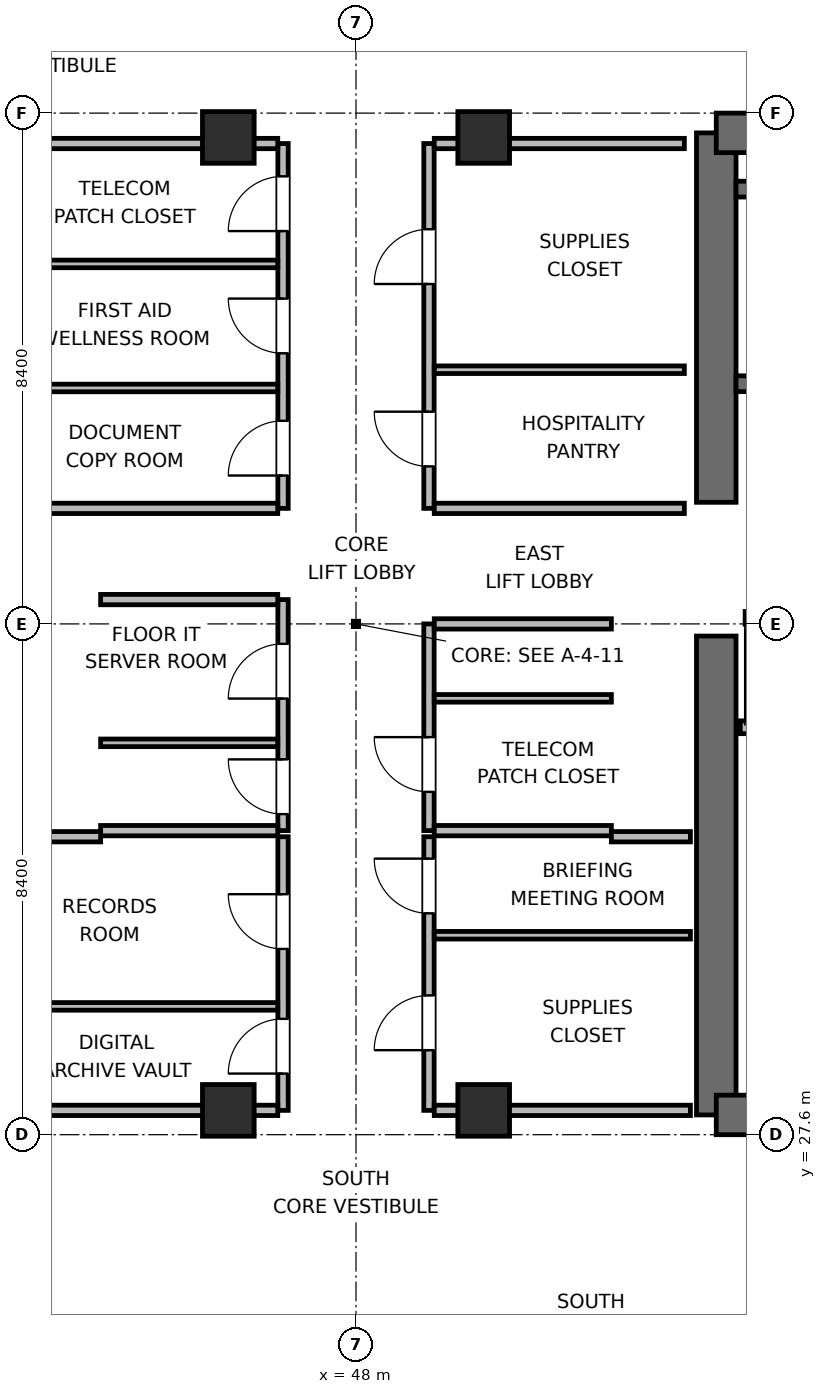
"""IFC4 building model, lengths in metres.
Left out: names, types, materials, properties, quantities, classifications, styles, units other than length and angle.
Written with IfcOpenShell. Run it as: python <this file> out.ifc"""

import sys

from ifc_helpers import new_model, si_unit, direction, frame, frame_2d, origin, origin_2d, place, context, subcontext, project, spatial, rectangle, extrude, element, fill, save


model = new_model("IFC4")
c1 = context("Model", 3, precision=1e-05, world=origin(), true_north=direction((0.0, 1.0)))
c2 = subcontext(c1, "Body", "Model", "MODEL_VIEW")
j1 = project(units=[si_unit("LENGTHUNIT", "METRE"), si_unit("PLANEANGLEUNIT", "RADIAN")], contexts=[c1])
p1 = place(None, origin())
s1 = spatial("IfcSite", under=j1, at=p1, CompositionType="ELEMENT")
p2 = place(p1, origin())
s2 = spatial("IfcBuilding", under=s1, at=p2, CompositionType="ELEMENT")
p3 = place(p2, frame((0.0, 0.0, 223.2)))
s3 = spatial("IfcBuildingStorey", under=s2, at=p3, CompositionType="ELEMENT", Elevation=223.2)
p4 = place(p3, frame((53.925, 27.925, 0.0), z_axis=(0.0, 0.0, 1.0), x_axis=(0.0, 1.0, 0.0)))
e1 = element("IfcWall", 1, at=p4, inside=s3, PredefinedType="SHEAR", context=c2, shape_type="SweptSolid", body=[
    extrude(rectangle(XDim=7.875, YDim=0.65, at=frame_2d((3.938, 0.0))), origin(), (0.0, 0.0, 1.0), 3.9),
])
p5 = place(p3, frame((53.925, 38.0, 0.0), z_axis=(0.0, 0.0, 1.0), x_axis=(0.0, 1.0, 0.0)))
e2 = element("IfcWall", 2, at=p5, inside=s3, PredefinedType="SHEAR", context=c2, shape_type="SweptSolid", body=[
    extrude(rectangle(XDim=6.075, YDim=0.65, at=frame_2d((3.038, 0.0))), origin(), (0.0, 0.0, 1.0), 3.9),
])
p6 = place(p3, frame((53.925, 27.925, 0.0), z_axis=(0.0, 0.0, 1.0), x_axis=(1.0, 0.0, 0.0)))
e3 = element("IfcWall", 3, at=p6, inside=s3, PredefinedType="SHEAR", context=c2, shape_type="SweptSolid", body=[
    extrude(rectangle(XDim=9.35, YDim=0.65, at=frame_2d((4.675, 0.0))), origin(), (0.0, 0.0, 1.0), 3.9),
])
p7 = place(p6, frame((3.975, 0.0, 0.0)))
e4 = element("IfcOpeningElement", 4, at=p7, cuts=e3, PredefinedType="OPENING", context=c2, shape_type="SweptSolid", body=[
    extrude(rectangle(XDim=1.05, YDim=2.04, at=frame_2d((0.525, 1.02))), frame((0.0, 0.335, 0.0), z_axis=(0.0, -1.0, 0.0), x_axis=(1.0, 0.0, 0.0)), (0.0, 0.0, 1.0), 0.67),
])
p8 = place(p3, frame((53.925, 44.075, 0.0), z_axis=(0.0, 0.0, 1.0), x_axis=(1.0, 0.0, 0.0)))
e5 = element("IfcWall", 5, at=p8, inside=s3, PredefinedType="SHEAR", context=c2, shape_type="SweptSolid", body=[
    extrude(rectangle(XDim=9.35, YDim=0.65, at=frame_2d((4.675, 0.0))), origin(), (0.0, 0.0, 1.0), 3.9),
])
p9 = place(p3, frame((54.25, 39.95, 0.0), z_axis=(0.0, 0.0, 1.0), x_axis=(1.0, 0.0, 0.0)))
e6 = element("IfcWall", 6, at=p9, inside=s3, PredefinedType="SHEAR", context=c2, shape_type="SweptSolid", body=[
    extrude(rectangle(XDim=8.7, YDim=0.26, at=frame_2d((4.35, 0.0))), origin(), (0.0, 0.0, 1.0), 3.9),
])
p10 = place(p9, frame((0.95, 0.0, 0.0)))
e7 = element("IfcOpeningElement", 7, at=p10, cuts=e6, PredefinedType="OPENING", context=c2, shape_type="SweptSolid", body=[
    extrude(rectangle(XDim=1.0, YDim=2.04, at=frame_2d((0.5, 1.02))), frame((0.0, 0.14, 0.0), z_axis=(0.0, -1.0, 0.0), x_axis=(1.0, 0.0, 0.0)), (0.0, 0.0, 1.0), 0.28),
])
p11 = place(p3, frame((54.25, 43.15, 0.0), z_axis=(0.0, 0.0, 1.0), x_axis=(1.0, 0.0, 0.0)))
e8 = element("IfcWall", 8, at=p11, inside=s3, PredefinedType="SHEAR", context=c2, shape_type="SweptSolid", body=[
    extrude(rectangle(XDim=8.7, YDim=0.26, at=frame_2d((4.35, 0.0))), origin(), (0.0, 0.0, 1.0), 3.9),
])
for number, where, z_axis, x_axis in (
    (9, (45.9, 28.0, 0.0), (0.0, 0.0, 1.0), (1.0, 0.0, 0.0)),
    (10, (50.1, 28.0, 0.0), (0.0, 0.0, 1.0), (1.0, 0.0, 0.0)),
    (11, (45.9, 44.0, 0.0), (0.0, 0.0, 1.0), (1.0, 0.0, 0.0)),
    (12, (50.1, 44.0, 0.0), (0.0, 0.0, 1.0), (1.0, 0.0, 0.0)),
):
    element("IfcColumn", number, at=place(p3, frame(where, z_axis=z_axis, x_axis=x_axis)), inside=s3, PredefinedType="COLUMN", context=c2, shape_type="SweptSolid", body=[
        extrude(rectangle(XDim=0.85, YDim=0.85, at=origin_2d()), origin(), (0.0, 0.0, 1.0), 3.9),
    ])
p12 = place(p3, frame((54.32, 34.3, 0.0), z_axis=(0.0, 0.0, 1.0), x_axis=(1.0, 0.0, 0.0)))
e13 = element("IfcWall", 13, at=p12, inside=s3, PredefinedType="PARTITIONING", context=c2, shape_type="SweptSolid", body=[
    extrude(rectangle(XDim=3.48, YDim=0.21, at=frame_2d((1.74, 0.0))), origin(), (0.0, 0.0, 1.0), 3.68),
])
p13 = place(p3, frame((54.4, 36.1, 0.0), z_axis=(0.0, 0.0, 1.0), x_axis=(1.0, 0.0, 0.0)))
e14 = element("IfcWall", 14, at=p13, inside=s3, PredefinedType="PARTITIONING", context=c2, shape_type="SweptSolid", body=[
    extrude(rectangle(XDim=2.1, YDim=0.21, at=frame_2d((1.05, 0.0))), origin(), (0.0, 0.0, 1.0), 3.68),
])
p14 = place(p13, frame((0.5, 0.0, 0.0)))
e15 = element("IfcOpeningElement", 15, at=p14, cuts=e14, PredefinedType="OPENING", context=c2, shape_type="SweptSolid", body=[
    extrude(rectangle(XDim=1.1, YDim=2.04, at=frame_2d((0.55, 1.02))), frame((0.0, 0.115, 0.0), z_axis=(0.0, -1.0, 0.0), x_axis=(1.0, 0.0, 0.0)), (0.0, 0.0, 1.0), 0.23),
])
p15 = place(p3, frame((46.8, 32.6, 0.0), z_axis=(0.0, 0.0, 1.0), x_axis=(0.0, 1.0, 0.0)))
e16 = element("IfcWall", 16, at=p15, inside=s3, PredefinedType="PARTITIONING", context=c2, shape_type="SweptSolid", body=[
    extrude(rectangle(XDim=3.8, YDim=0.17, at=frame_2d((1.9, 0.0))), origin(), (0.0, 0.0, 1.0), 3.68),
])
p16 = place(p15, frame((0.272, 0.0, 0.0)))
e17 = element("IfcOpeningElement", 17, at=p16, cuts=e16, PredefinedType="OPENING", context=c2, shape_type="SweptSolid", body=[
    extrude(rectangle(XDim=0.9, YDim=2.02, at=frame_2d((0.45, 1.01))), frame((0.0, 0.095, 0.0), z_axis=(0.0, -1.0, 0.0), x_axis=(1.0, 0.0, 0.0)), (0.0, 0.0, 1.0), 0.19),
])
p17 = place(p15, frame((2.172, 0.0, 0.0)))
e18 = element("IfcOpeningElement", 18, at=p17, cuts=e16, PredefinedType="OPENING", context=c2, shape_type="SweptSolid", body=[
    extrude(rectangle(XDim=0.9, YDim=2.02, at=frame_2d((0.45, 1.01))), frame((0.0, 0.095, 0.0), z_axis=(0.0, -1.0, 0.0), x_axis=(1.0, 0.0, 0.0)), (0.0, 0.0, 1.0), 0.19),
])
for number, where, z_axis, x_axis in (
    (19, (43.8, 32.6, 0.0), (0.0, 0.0, 1.0), (1.0, 0.0, 0.0)),
    (20, (43.8, 36.4, 0.0), (0.0, 0.0, 1.0), (1.0, 0.0, 0.0)),
):
    element("IfcWall", number, at=place(p3, frame(where, z_axis=z_axis, x_axis=x_axis)), inside=s3, PredefinedType="PARTITIONING", context=c2, shape_type="SweptSolid", body=[
        extrude(rectangle(XDim=2.913, YDim=0.17, at=frame_2d((1.457, 0.0))), origin(), (0.0, 0.0, 1.0), 3.68),
    ])
p18 = place(p3, frame((43.8, 34.044, 0.0), z_axis=(0.0, 0.0, 1.0), x_axis=(1.0, 0.0, 0.0)))
e21 = element("IfcWall", 21, at=p18, inside=s3, PredefinedType="PARTITIONING", context=c2, shape_type="SweptSolid", body=[
    extrude(rectangle(XDim=2.913, YDim=0.125, at=frame_2d((1.457, 0.0))), origin(), (0.0, 0.0, 1.0), 3.68),
])
p19 = place(p3, frame((49.2, 32.6, 0.0), z_axis=(0.0, 0.0, 1.0), x_axis=(0.0, 1.0, 0.0)))
e22 = element("IfcWall", 22, at=p19, inside=s3, PredefinedType="PARTITIONING", context=c2, shape_type="SweptSolid", body=[
    extrude(rectangle(XDim=3.4, YDim=0.17, at=frame_2d((1.7, 0.0))), origin(), (0.0, 0.0, 1.0), 3.68),
])
p20 = place(p19, frame((0.638, 0.0, 0.0)))
e23 = element("IfcOpeningElement", 23, at=p20, cuts=e22, PredefinedType="OPENING", context=c2, shape_type="SweptSolid", body=[
    extrude(rectangle(XDim=0.9, YDim=2.02, at=frame_2d((0.45, 1.01))), frame((0.0, 0.095, 0.0), z_axis=(0.0, -1.0, 0.0), x_axis=(1.0, 0.0, 0.0)), (0.0, 0.0, 1.0), 0.19),
])
for number, where, z_axis, x_axis in (
    (24, (49.287, 32.6, 0.0), (0.0, 0.0, 1.0), (1.0, 0.0, 0.0)),
    (25, (49.287, 36.0, 0.0), (0.0, 0.0, 1.0), (1.0, 0.0, 0.0)),
):
    element("IfcWall", number, at=place(p3, frame(where, z_axis=z_axis, x_axis=x_axis)), inside=s3, PredefinedType="PARTITIONING", context=c2, shape_type="SweptSolid", body=[
        extrude(rectangle(XDim=2.913, YDim=0.17, at=frame_2d((1.457, 0.0))), origin(), (0.0, 0.0, 1.0), 3.68),
    ])
p21 = place(p3, frame((49.287, 34.776, 0.0), z_axis=(0.0, 0.0, 1.0), x_axis=(1.0, 0.0, 0.0)))
e26 = element("IfcWall", 26, at=p21, inside=s3, PredefinedType="PARTITIONING", context=c2, shape_type="SweptSolid", body=[
    extrude(rectangle(XDim=2.913, YDim=0.125, at=frame_2d((1.457, 0.0))), origin(), (0.0, 0.0, 1.0), 3.68),
])
p22 = place(p3, frame((46.8, 28.0, 0.0), z_axis=(0.0, 0.0, 1.0), x_axis=(0.0, 1.0, 0.0)))
e27 = element("IfcWall", 27, at=p22, inside=s3, PredefinedType="PARTITIONING", context=c2, shape_type="SweptSolid", body=[
    extrude(rectangle(XDim=4.5, YDim=0.17, at=frame_2d((2.25, 0.0))), origin(), (0.0, 0.0, 1.0), 3.68),
])
p23 = place(p22, frame((0.605, 0.0, 0.0)))
e28 = element("IfcOpeningElement", 28, at=p23, cuts=e27, PredefinedType="OPENING", context=c2, shape_type="SweptSolid", body=[
    extrude(rectangle(XDim=0.9, YDim=2.02, at=frame_2d((0.45, 1.01))), frame((0.0, 0.095, 0.0), z_axis=(0.0, -1.0, 0.0), x_axis=(1.0, 0.0, 0.0)), (0.0, 0.0, 1.0), 0.19),
])
p24 = place(p22, frame((2.655, 0.0, 0.0)))
e29 = element("IfcOpeningElement", 29, at=p24, cuts=e27, PredefinedType="OPENING", context=c2, shape_type="SweptSolid", body=[
    extrude(rectangle(XDim=0.9, YDim=2.02, at=frame_2d((0.45, 1.01))), frame((0.0, 0.095, 0.0), z_axis=(0.0, -1.0, 0.0), x_axis=(1.0, 0.0, 0.0)), (0.0, 0.0, 1.0), 0.19),
])
p25 = place(p3, frame((42.5, 28.0, 0.0), z_axis=(0.0, 0.0, 1.0), x_axis=(1.0, 0.0, 0.0)))
e30 = element("IfcWall", 30, at=p25, inside=s3, PredefinedType="PARTITIONING", context=c2, shape_type="SweptSolid", body=[
    extrude(rectangle(XDim=4.213, YDim=0.17, at=frame_2d((2.106, 0.0))), origin(), (0.0, 0.0, 1.0), 2.765),
])
p26 = place(p3, frame((42.5, 32.5, 0.0), z_axis=(0.0, 0.0, 1.0), x_axis=(1.0, 0.0, 0.0)))
e31 = element("IfcWall", 31, at=p26, inside=s3, PredefinedType="PARTITIONING", context=c2, shape_type="SweptSolid", body=[
    extrude(rectangle(XDim=1.3, YDim=0.17, at=frame_2d((0.65, 0.0))), origin(), (0.0, 0.0, 1.0), 3.68),
])
p27 = place(p3, frame((42.5, 29.71, 0.0), z_axis=(0.0, 0.0, 1.0), x_axis=(1.0, 0.0, 0.0)))
e32 = element("IfcWall", 32, at=p27, inside=s3, PredefinedType="PARTITIONING", context=c2, shape_type="SweptSolid", body=[
    extrude(rectangle(XDim=4.213, YDim=0.125, at=frame_2d((2.106, 0.0))), origin(), (0.0, 0.0, 1.0), 3.68),
])
p28 = place(p3, frame((49.2, 28.0, 0.0), z_axis=(0.0, 0.0, 1.0), x_axis=(0.0, 1.0, 0.0)))
e33 = element("IfcWall", 33, at=p28, inside=s3, PredefinedType="PARTITIONING", context=c2, shape_type="SweptSolid", body=[
    extrude(rectangle(XDim=4.5, YDim=0.17, at=frame_2d((2.25, 0.0))), origin(), (0.0, 0.0, 1.0), 3.68),
])
p29 = place(p28, frame((0.99, 0.0, 0.0)))
e34 = element("IfcOpeningElement", 34, at=p29, cuts=e33, PredefinedType="OPENING", context=c2, shape_type="SweptSolid", body=[
    extrude(rectangle(XDim=0.9, YDim=2.02, at=frame_2d((0.45, 1.01))), frame((0.0, 0.095, 0.0), z_axis=(0.0, -1.0, 0.0), x_axis=(1.0, 0.0, 0.0)), (0.0, 0.0, 1.0), 0.19),
])
p30 = place(p28, frame((3.24, 0.0, 0.0)))
e35 = element("IfcOpeningElement", 35, at=p30, cuts=e33, PredefinedType="OPENING", context=c2, shape_type="SweptSolid", body=[
    extrude(rectangle(XDim=0.9, YDim=2.02, at=frame_2d((0.45, 1.01))), frame((0.0, 0.095, 0.0), z_axis=(0.0, -1.0, 0.0), x_axis=(1.0, 0.0, 0.0)), (0.0, 0.0, 1.0), 0.19),
])
p31 = place(p3, frame((49.287, 28.0, 0.0), z_axis=(0.0, 0.0, 1.0), x_axis=(1.0, 0.0, 0.0)))
e36 = element("IfcWall", 36, at=p31, inside=s3, PredefinedType="PARTITIONING", context=c2, shape_type="SweptSolid", body=[
    extrude(rectangle(XDim=4.213, YDim=0.17, at=frame_2d((2.106, 0.0))), origin(), (0.0, 0.0, 1.0), 2.765),
])
p32 = place(p3, frame((52.2, 32.5, 0.0), z_axis=(0.0, 0.0, 1.0), x_axis=(1.0, 0.0, 0.0)))
e37 = element("IfcWall", 37, at=p32, inside=s3, PredefinedType="PARTITIONING", context=c2, shape_type="SweptSolid", body=[
    extrude(rectangle(XDim=1.3, YDim=0.17, at=frame_2d((0.65, 0.0))), origin(), (0.0, 0.0, 1.0), 3.68),
])
p33 = place(p3, frame((49.287, 30.88, 0.0), z_axis=(0.0, 0.0, 1.0), x_axis=(1.0, 0.0, 0.0)))
e38 = element("IfcWall", 38, at=p33, inside=s3, PredefinedType="PARTITIONING", context=c2, shape_type="SweptSolid", body=[
    extrude(rectangle(XDim=4.213, YDim=0.125, at=frame_2d((2.106, 0.0))), origin(), (0.0, 0.0, 1.0), 3.68),
])
p34 = place(p3, frame((46.8, 37.9, 0.0), z_axis=(0.0, 0.0, 1.0), x_axis=(0.0, 1.0, 0.0)))
e39 = element("IfcWall", 39, at=p34, inside=s3, PredefinedType="PARTITIONING", context=c2, shape_type="SweptSolid", body=[
    extrude(rectangle(XDim=6.0, YDim=0.17, at=frame_2d((3.0, 0.0))), origin(), (0.0, 0.0, 1.0), 3.68),
])
p35 = place(p34, frame((0.54, 0.0, 0.0)))
e40 = element("IfcOpeningElement", 40, at=p35, cuts=e39, PredefinedType="OPENING", context=c2, shape_type="SweptSolid", body=[
    extrude(rectangle(XDim=0.9, YDim=2.02, at=frame_2d((0.45, 1.01))), frame((0.0, 0.095, 0.0), z_axis=(0.0, -1.0, 0.0), x_axis=(1.0, 0.0, 0.0)), (0.0, 0.0, 1.0), 0.19),
])
p36 = place(p34, frame((2.55, 0.0, 0.0)))
e41 = element("IfcOpeningElement", 41, at=p36, cuts=e39, PredefinedType="OPENING", context=c2, shape_type="SweptSolid", body=[
    extrude(rectangle(XDim=0.9, YDim=2.02, at=frame_2d((0.45, 1.01))), frame((0.0, 0.095, 0.0), z_axis=(0.0, -1.0, 0.0), x_axis=(1.0, 0.0, 0.0)), (0.0, 0.0, 1.0), 0.19),
])
p37 = place(p34, frame((4.56, 0.0, 0.0)))
e42 = element("IfcOpeningElement", 42, at=p37, cuts=e39, PredefinedType="OPENING", context=c2, shape_type="SweptSolid", body=[
    extrude(rectangle(XDim=0.9, YDim=2.02, at=frame_2d((0.45, 1.01))), frame((0.0, 0.095, 0.0), z_axis=(0.0, -1.0, 0.0), x_axis=(1.0, 0.0, 0.0)), (0.0, 0.0, 1.0), 0.19),
])
p38 = place(p3, frame((42.5, 37.9, 0.0), z_axis=(0.0, 0.0, 1.0), x_axis=(1.0, 0.0, 0.0)))
e43 = element("IfcWall", 43, at=p38, inside=s3, PredefinedType="PARTITIONING", context=c2, shape_type="SweptSolid", body=[
    extrude(rectangle(XDim=4.213, YDim=0.17, at=frame_2d((2.106, 0.0))), origin(), (0.0, 0.0, 1.0), 3.68),
])
p39 = place(p3, frame((42.5, 43.9, 0.0), z_axis=(0.0, 0.0, 1.0), x_axis=(1.0, 0.0, 0.0)))
e44 = element("IfcWall", 44, at=p39, inside=s3, PredefinedType="PARTITIONING", context=c2, shape_type="SweptSolid", body=[
    extrude(rectangle(XDim=4.213, YDim=0.17, at=frame_2d((2.106, 0.0))), origin(), (0.0, 0.0, 1.0), 2.765),
])
for number, where, z_axis, x_axis in (
    (45, (42.5, 39.88, 0.0), (0.0, 0.0, 1.0), (1.0, 0.0, 0.0)),
    (46, (42.5, 41.92, 0.0), (0.0, 0.0, 1.0), (1.0, 0.0, 0.0)),
):
    element("IfcWall", number, at=place(p3, frame(where, z_axis=z_axis, x_axis=x_axis)), inside=s3, PredefinedType="PARTITIONING", context=c2, shape_type="SweptSolid", body=[
        extrude(rectangle(XDim=4.213, YDim=0.125, at=frame_2d((2.106, 0.0))), origin(), (0.0, 0.0, 1.0), 3.68),
    ])
p40 = place(p3, frame((49.2, 37.9, 0.0), z_axis=(0.0, 0.0, 1.0), x_axis=(0.0, 1.0, 0.0)))
e47 = element("IfcWall", 47, at=p40, inside=s3, PredefinedType="PARTITIONING", context=c2, shape_type="SweptSolid", body=[
    extrude(rectangle(XDim=6.0, YDim=0.17, at=frame_2d((3.0, 0.0))), origin(), (0.0, 0.0, 1.0), 3.68),
])
p41 = place(p40, frame((0.69, 0.0, 0.0)))
e48 = element("IfcOpeningElement", 48, at=p41, cuts=e47, PredefinedType="OPENING", context=c2, shape_type="SweptSolid", body=[
    extrude(rectangle(XDim=0.9, YDim=2.02, at=frame_2d((0.45, 1.01))), frame((0.0, 0.095, 0.0), z_axis=(0.0, -1.0, 0.0), x_axis=(1.0, 0.0, 0.0)), (0.0, 0.0, 1.0), 0.19),
])
p42 = place(p40, frame((3.69, 0.0, 0.0)))
e49 = element("IfcOpeningElement", 49, at=p42, cuts=e47, PredefinedType="OPENING", context=c2, shape_type="SweptSolid", body=[
    extrude(rectangle(XDim=0.9, YDim=2.02, at=frame_2d((0.45, 1.01))), frame((0.0, 0.095, 0.0), z_axis=(0.0, -1.0, 0.0), x_axis=(1.0, 0.0, 0.0)), (0.0, 0.0, 1.0), 0.19),
])
p43 = place(p3, frame((49.287, 37.9, 0.0), z_axis=(0.0, 0.0, 1.0), x_axis=(1.0, 0.0, 0.0)))
e50 = element("IfcWall", 50, at=p43, inside=s3, PredefinedType="PARTITIONING", context=c2, shape_type="SweptSolid", body=[
    extrude(rectangle(XDim=4.113, YDim=0.17, at=frame_2d((2.056, 0.0))), origin(), (0.0, 0.0, 1.0), 3.68),
])
p44 = place(p3, frame((49.287, 43.9, 0.0), z_axis=(0.0, 0.0, 1.0), x_axis=(1.0, 0.0, 0.0)))
e51 = element("IfcWall", 51, at=p44, inside=s3, PredefinedType="PARTITIONING", context=c2, shape_type="SweptSolid", body=[
    extrude(rectangle(XDim=4.113, YDim=0.17, at=frame_2d((2.056, 0.0))), origin(), (0.0, 0.0, 1.0), 2.765),
])
p45 = place(p3, frame((49.287, 40.18, 0.0), z_axis=(0.0, 0.0, 1.0), x_axis=(1.0, 0.0, 0.0)))
e52 = element("IfcWall", 52, at=p45, inside=s3, PredefinedType="PARTITIONING", context=c2, shape_type="SweptSolid", body=[
    extrude(rectangle(XDim=4.113, YDim=0.125, at=frame_2d((2.056, 0.0))), origin(), (0.0, 0.0, 1.0), 3.68),
])
p46 = place(p16, origin())
e53 = element("IfcDoor", 53, at=p46, inside=s3, OperationType="SINGLE_SWING_RIGHT", PredefinedType="DOOR", context=c2, shape_type="SweptSolid", body=[
    extrude(rectangle(XDim=0.9, YDim=2.02, at=frame_2d((0.45, 1.01))), frame((0.0, 0.025, 0.0), z_axis=(0.0, -1.0, 0.0), x_axis=(1.0, 0.0, 0.0)), (0.0, 0.0, 1.0), 0.05),
])
fill(e17, e53)
p47 = place(p17, origin())
e54 = element("IfcDoor", 54, at=p47, inside=s3, OperationType="SINGLE_SWING_LEFT", PredefinedType="DOOR", context=c2, shape_type="SweptSolid", body=[
    extrude(rectangle(XDim=0.9, YDim=2.02, at=frame_2d((0.45, 1.01))), frame((0.0, 0.025, 0.0), z_axis=(0.0, -1.0, 0.0), x_axis=(1.0, 0.0, 0.0)), (0.0, 0.0, 1.0), 0.05),
])
fill(e18, e54)
p48 = place(p20, origin())
e55 = element("IfcDoor", 55, at=p48, inside=s3, OperationType="SINGLE_SWING_RIGHT", PredefinedType="DOOR", context=c2, shape_type="SweptSolid", body=[
    extrude(rectangle(XDim=0.9, YDim=2.02, at=frame_2d((0.45, 1.01))), frame((0.0, 0.025, 0.0), z_axis=(0.0, -1.0, 0.0), x_axis=(1.0, 0.0, 0.0)), (0.0, 0.0, 1.0), 0.05),
])
fill(e23, e55)
p49 = place(p23, origin())
e56 = element("IfcDoor", 56, at=p49, inside=s3, OperationType="SINGLE_SWING_LEFT", PredefinedType="DOOR", context=c2, shape_type="SweptSolid", body=[
    extrude(rectangle(XDim=0.9, YDim=2.02, at=frame_2d((0.45, 1.01))), frame((0.0, 0.025, 0.0), z_axis=(0.0, -1.0, 0.0), x_axis=(1.0, 0.0, 0.0)), (0.0, 0.0, 1.0), 0.05),
])
fill(e28, e56)
p50 = place(p24, origin())
e57 = element("IfcDoor", 57, at=p50, inside=s3, OperationType="SINGLE_SWING_RIGHT", PredefinedType="DOOR", context=c2, shape_type="SweptSolid", body=[
    extrude(rectangle(XDim=0.9, YDim=2.02, at=frame_2d((0.45, 1.01))), frame((0.0, 0.025, 0.0), z_axis=(0.0, -1.0, 0.0), x_axis=(1.0, 0.0, 0.0)), (0.0, 0.0, 1.0), 0.05),
])
fill(e29, e57)
p51 = place(p29, origin())
e58 = element("IfcDoor", 58, at=p51, inside=s3, OperationType="SINGLE_SWING_LEFT", PredefinedType="DOOR", context=c2, shape_type="SweptSolid", body=[
    extrude(rectangle(XDim=0.9, YDim=2.02, at=frame_2d((0.45, 1.01))), frame((0.0, 0.025, 0.0), z_axis=(0.0, -1.0, 0.0), x_axis=(1.0, 0.0, 0.0)), (0.0, 0.0, 1.0), 0.05),
])
fill(e34, e58)
p52 = place(p30, origin())
e59 = element("IfcDoor", 59, at=p52, inside=s3, OperationType="SINGLE_SWING_RIGHT", PredefinedType="DOOR", context=c2, shape_type="SweptSolid", body=[
    extrude(rectangle(XDim=0.9, YDim=2.02, at=frame_2d((0.45, 1.01))), frame((0.0, 0.025, 0.0), z_axis=(0.0, -1.0, 0.0), x_axis=(1.0, 0.0, 0.0)), (0.0, 0.0, 1.0), 0.05),
])
fill(e35, e59)
p53 = place(p35, origin())
e60 = element("IfcDoor", 60, at=p53, inside=s3, OperationType="SINGLE_SWING_LEFT", PredefinedType="DOOR", context=c2, shape_type="SweptSolid", body=[
    extrude(rectangle(XDim=0.9, YDim=2.02, at=frame_2d((0.45, 1.01))), frame((0.0, 0.025, 0.0), z_axis=(0.0, -1.0, 0.0), x_axis=(1.0, 0.0, 0.0)), (0.0, 0.0, 1.0), 0.05),
])
fill(e40, e60)
p54 = place(p36, origin())
e61 = element("IfcDoor", 61, at=p54, inside=s3, OperationType="SINGLE_SWING_RIGHT", PredefinedType="DOOR", context=c2, shape_type="SweptSolid", body=[
    extrude(rectangle(XDim=0.9, YDim=2.02, at=frame_2d((0.45, 1.01))), frame((0.0, 0.025, 0.0), z_axis=(0.0, -1.0, 0.0), x_axis=(1.0, 0.0, 0.0)), (0.0, 0.0, 1.0), 0.05),
])
fill(e41, e61)
p55 = place(p37, origin())
e62 = element("IfcDoor", 62, at=p55, inside=s3, OperationType="SINGLE_SWING_LEFT", PredefinedType="DOOR", context=c2, shape_type="SweptSolid", body=[
    extrude(rectangle(XDim=0.9, YDim=2.02, at=frame_2d((0.45, 1.01))), frame((0.0, 0.025, 0.0), z_axis=(0.0, -1.0, 0.0), x_axis=(1.0, 0.0, 0.0)), (0.0, 0.0, 1.0), 0.05),
])
fill(e42, e62)
p56 = place(p41, origin())
e63 = element("IfcDoor", 63, at=p56, inside=s3, OperationType="SINGLE_SWING_RIGHT", PredefinedType="DOOR", context=c2, shape_type="SweptSolid", body=[
    extrude(rectangle(XDim=0.9, YDim=2.02, at=frame_2d((0.45, 1.01))), frame((0.0, 0.025, 0.0), z_axis=(0.0, -1.0, 0.0), x_axis=(1.0, 0.0, 0.0)), (0.0, 0.0, 1.0), 0.05),
])
fill(e48, e63)
p57 = place(p42, origin())
e64 = element("IfcDoor", 64, at=p57, inside=s3, OperationType="SINGLE_SWING_LEFT", PredefinedType="DOOR", context=c2, shape_type="SweptSolid", body=[
    extrude(rectangle(XDim=0.9, YDim=2.02, at=frame_2d((0.45, 1.01))), frame((0.0, 0.025, 0.0), z_axis=(0.0, -1.0, 0.0), x_axis=(1.0, 0.0, 0.0)), (0.0, 0.0, 1.0), 0.05),
])
fill(e49, e64)
save(model, sys.argv[1])
